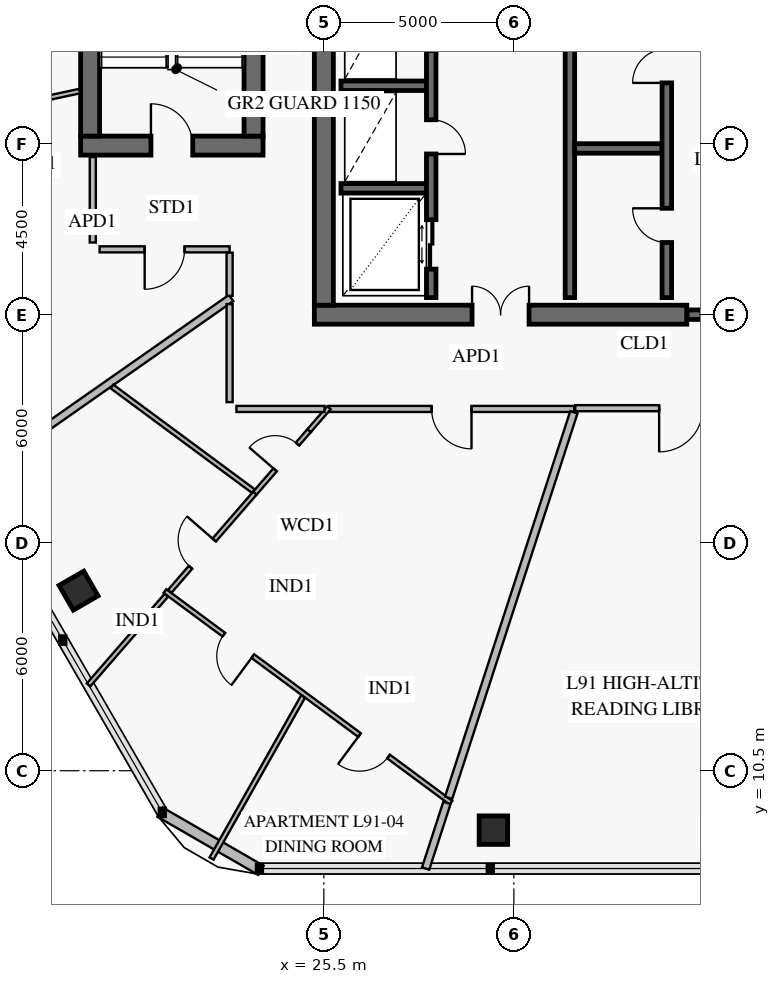
"""IFC4 building model, lengths in metres.
Left out: names, types, materials, properties, quantities, classifications, styles, units other than length and angle.
Written with IfcOpenShell. Run it as: python <this file> out.ifc"""

import sys

from ifc_helpers import new_model, si_unit, direction, frame, frame_2d, origin, origin_2d, place, context, subcontext, project, spatial, rectangle, extrude, element, fill, save


model = new_model("IFC4")
c1 = context("Model", 3, precision=1e-05, world=origin(), true_north=direction((0.0, 1.0)))
c2 = subcontext(c1, "Body", "Model", "MODEL_VIEW")
j1 = project(units=[si_unit("LENGTHUNIT", "METRE"), si_unit("PLANEANGLEUNIT", "RADIAN")], contexts=[c1])
p1 = place(None, origin())
s1 = spatial("IfcSite", under=j1, at=p1, CompositionType="ELEMENT")
p2 = place(p1, origin())
s2 = spatial("IfcBuilding", under=s1, at=p2, CompositionType="ELEMENT")
p3 = place(p2, frame((0.0, 0.0, 357.6)))
s3 = spatial("IfcBuildingStorey", under=s2, at=p3, CompositionType="ELEMENT", Elevation=357.6)
p4 = place(p3, frame((25.25, 22.5, 0.0), z_axis=(0.0, 0.0, 1.0), x_axis=(1.0, 0.0, 0.0)))
e1 = element("IfcWall", 1, at=p4, inside=s3, PredefinedType="SHEAR", context=c2, shape_type="SweptSolid", body=[
    extrude(rectangle(XDim=9.8, YDim=0.5, at=frame_2d((4.9, 0.0))), origin(), (0.0, 0.0, 1.0), 3.8),
])
p5 = place(p4, frame((4.15, 0.0, 0.0)))
e2 = element("IfcOpeningElement", 2, at=p5, cuts=e1, PredefinedType="OPENING", context=c2, shape_type="SweptSolid", body=[
    extrude(rectangle(XDim=1.5, YDim=2.15, at=frame_2d((0.75, 1.075))), frame((0.0, 0.262, 0.0), z_axis=(0.0, -1.0, 0.0), x_axis=(1.0, 0.0, 0.0)), (0.0, 0.0, 1.0), 0.524),
])
p6 = place(p3, frame((25.5, 22.75, 0.0), z_axis=(0.0, 0.0, 1.0), x_axis=(0.0, 1.0, 0.0)))
e3 = element("IfcWall", 3, at=p6, inside=s3, PredefinedType="SHEAR", context=c2, shape_type="SweptSolid", body=[
    extrude(rectangle(XDim=18.5, YDim=0.5, at=frame_2d((9.25, 0.0))), origin(), (0.0, 0.0, 1.0), 3.8),
])
p7 = place(p6, frame((9.0, 0.0, 0.0)))
e4 = element("IfcOpeningElement", 4, at=p7, cuts=e3, PredefinedType="OPENING", context=c2, shape_type="SweptSolid", body=[
    extrude(rectangle(XDim=1.1, YDim=2.15, at=frame_2d((0.55, 1.075))), frame((0.0, 0.262, 0.0), z_axis=(0.0, -1.0, 0.0), x_axis=(1.0, 0.0, 0.0)), (0.0, 0.0, 1.0), 0.524),
])
for number, where, z_axis, x_axis in (
    (5, (19.045, 15.238, 0.0), (0.0, 0.0, 1.0), (0.5, -0.866, 0.0)),
    (6, (29.961, 8.936, 0.0), (0.0, 0.0, 1.0), (1.0, 0.0, 0.0)),
):
    element("IfcColumn", number, at=place(p3, frame(where, z_axis=z_axis, x_axis=x_axis)), inside=s3, PredefinedType="COLUMN", context=c2, shape_type="SweptSolid", body=[
        extrude(rectangle(XDim=0.75, YDim=0.75, at=origin_2d()), origin(), (0.0, 0.0, 1.0), 3.35),
    ])
p8 = place(p3, frame((19.1, 26.95, 0.0), z_axis=(0.0, 0.0, 1.0), x_axis=(1.0, 0.0, 0.0)))
e7 = element("IfcWall", 7, at=p8, inside=s3, PredefinedType="SHEAR", context=c2, shape_type="SweptSolid", body=[
    extrude(rectangle(XDim=4.8, YDim=0.5, at=frame_2d((2.4, 0.0))), origin(), (0.0, 0.0, 1.0), 3.8),
])
p9 = place(p8, frame((1.85, 0.0, 0.0)))
e8 = element("IfcOpeningElement", 8, at=p9, cuts=e7, PredefinedType="OPENING", context=c2, shape_type="SweptSolid", body=[
    extrude(rectangle(XDim=1.1, YDim=2.15, at=frame_2d((0.55, 1.075))), frame((0.0, 0.262, 0.0), z_axis=(0.0, -1.0, 0.0), x_axis=(1.0, 0.0, 0.0)), (0.0, 0.0, 1.0), 0.524),
])
for number, where, z_axis, x_axis in (
    (9, (19.35, 27.2, 0.0), (0.0, 0.0, 1.0), (0.0, 1.0, 0.0)),
    (10, (23.65, 36.8, 0.0), (0.0, 0.0, 1.0), (0.0, -1.0, 0.0)),
):
    element("IfcWall", number, at=place(p3, frame(where, z_axis=z_axis, x_axis=x_axis)), inside=s3, PredefinedType="SHEAR", context=c2, shape_type="SweptSolid", body=[
        extrude(rectangle(XDim=9.6, YDim=0.5, at=frame_2d((4.8, 0.0))), origin(), (0.0, 0.0, 1.0), 3.8),
    ])
p10 = place(p3, frame((23.843, 7.878, 0.0), z_axis=(0.0, 0.0, 1.0), x_axis=(-0.866023752521, 0.50000286006, 0.0)))
e11 = element("IfcWall", 11, at=p10, inside=s3, PredefinedType="SOLIDWALL", context=c2, shape_type="SweptSolid", body=[
    extrude(rectangle(XDim=3.065, YDim=0.28, at=frame_2d((1.532, 0.0))), origin(), (0.0, 0.0, 1.0), 3.35),
])
p11 = place(p3, frame((35.06, 22.5, 0.0), z_axis=(0.0, 0.0, 1.0), x_axis=(1.0, 0.0, 0.0)))
e12 = element("IfcWall", 12, at=p11, inside=s3, PredefinedType="SOLIDWALL", context=c2, shape_type="SweptSolid", body=[
    extrude(rectangle(XDim=2.28, YDim=0.25, at=frame_2d((1.14, 0.0))), origin(), (0.0, 0.0, 1.0), 3.8),
])
p12 = place(p11, frame((0.39, 0.0, 0.0)))
e13 = element("IfcOpeningElement", 13, at=p12, cuts=e12, PredefinedType="OPENING", context=c2, shape_type="SweptSolid", body=[
    extrude(rectangle(XDim=1.5, YDim=2.15, at=frame_2d((0.75, 1.075))), frame((0.0, 0.137, 0.0), z_axis=(0.0, -1.0, 0.0), x_axis=(1.0, 0.0, 0.0)), (0.0, 0.0, 1.0), 0.274),
])
for number, where, z_axis, x_axis in (
    (14, (25.95, 25.825, 0.0), (0.0, 0.0, 1.0), (1.0, 0.0, 0.0)),
    (15, (25.95, 28.525, 0.0), (0.0, 0.0, 1.0), (1.0, 0.0, 0.0)),
):
    element("IfcWall", number, at=place(p3, frame(where, z_axis=z_axis, x_axis=x_axis)), inside=s3, PredefinedType="SOLIDWALL", context=c2, shape_type="SweptSolid", body=[
        extrude(rectangle(XDim=2.25, YDim=0.25, at=frame_2d((1.125, 0.0))), origin(), (0.0, 0.0, 1.0), 3.8),
    ])
p13 = place(p3, frame((28.325, 22.95, 0.0), z_axis=(0.0, 0.0, 1.0), x_axis=(0.0, 1.0, 0.0)))
e16 = element("IfcWall", 16, at=p13, inside=s3, PredefinedType="SOLIDWALL", context=c2, shape_type="SweptSolid", body=[
    extrude(rectangle(XDim=8.2, YDim=0.25, at=frame_2d((4.1, 0.0))), origin(), (0.0, 0.0, 1.0), 3.8),
])
p14 = place(p13, frame((0.75, 0.0, 0.0)))
e17 = element("IfcOpeningElement", 17, at=p14, cuts=e16, PredefinedType="OPENING", context=c2, shape_type="SweptSolid", body=[
    extrude(rectangle(XDim=1.3, YDim=2.3, at=frame_2d((0.65, 1.15))), frame((0.0, 0.137, 0.0), z_axis=(0.0, -1.0, 0.0), x_axis=(1.0, 0.0, 0.0)), (0.0, 0.0, 1.0), 0.274),
])
p15 = place(p13, frame((3.78, 0.0, 0.0)))
e18 = element("IfcOpeningElement", 18, at=p15, cuts=e16, PredefinedType="OPENING", context=c2, shape_type="SweptSolid", body=[
    extrude(rectangle(XDim=0.9, YDim=2.1, at=frame_2d((0.45, 1.05))), frame((0.0, 0.137, 0.0), z_axis=(0.0, -1.0, 0.0), x_axis=(1.0, 0.0, 0.0)), (0.0, 0.0, 1.0), 0.274),
])
p16 = place(p13, frame((6.5, 0.0, 0.0)))
e19 = element("IfcOpeningElement", 19, at=p16, cuts=e16, PredefinedType="OPENING", context=c2, shape_type="SweptSolid", body=[
    extrude(rectangle(XDim=0.9, YDim=2.1, at=frame_2d((0.45, 1.05))), frame((0.0, 0.137, 0.0), z_axis=(0.0, -1.0, 0.0), x_axis=(1.0, 0.0, 0.0)), (0.0, 0.0, 1.0), 0.274),
])
p17 = place(p3, frame((31.975, 22.95, 0.0), z_axis=(0.0, 0.0, 1.0), x_axis=(0.0, 1.0, 0.0)))
e20 = element("IfcWall", 20, at=p17, inside=s3, PredefinedType="SOLIDWALL", context=c2, shape_type="SweptSolid", body=[
    extrude(rectangle(XDim=8.2, YDim=0.25, at=frame_2d((4.1, 0.0))), origin(), (0.0, 0.0, 1.0), 3.8),
])
p18 = place(p3, frame((32.1, 26.875, 0.0), z_axis=(0.0, 0.0, 1.0), x_axis=(1.0, 0.0, 0.0)))
e21 = element("IfcWall", 21, at=p18, inside=s3, PredefinedType="SOLIDWALL", context=c2, shape_type="SweptSolid", body=[
    extrude(rectangle(XDim=2.3, YDim=0.25, at=frame_2d((1.15, 0.0))), origin(), (0.0, 0.0, 1.0), 3.8),
])
p19 = place(p3, frame((34.525, 22.95, 0.0), z_axis=(0.0, 0.0, 1.0), x_axis=(0.0, 1.0, 0.0)))
e22 = element("IfcWall", 22, at=p19, inside=s3, PredefinedType="SOLIDWALL", context=c2, shape_type="SweptSolid", body=[
    extrude(rectangle(XDim=8.2, YDim=0.25, at=frame_2d((4.1, 0.0))), origin(), (0.0, 0.0, 1.0), 3.8),
])
p20 = place(p19, frame((1.45, 0.0, 0.0)))
e23 = element("IfcOpeningElement", 23, at=p20, cuts=e22, PredefinedType="OPENING", context=c2, shape_type="SweptSolid", body=[
    extrude(rectangle(XDim=0.9, YDim=2.1, at=frame_2d((0.45, 1.05))), frame((0.0, 0.137, 0.0), z_axis=(0.0, -1.0, 0.0), x_axis=(1.0, 0.0, 0.0)), (0.0, 0.0, 1.0), 0.274),
])
p21 = place(p19, frame((5.65, 0.0, 0.0)))
e24 = element("IfcOpeningElement", 24, at=p21, cuts=e22, PredefinedType="OPENING", context=c2, shape_type="SweptSolid", body=[
    extrude(rectangle(XDim=0.9, YDim=2.1, at=frame_2d((0.45, 1.05))), frame((0.0, 0.137, 0.0), z_axis=(0.0, -1.0, 0.0), x_axis=(1.0, 0.0, 0.0)), (0.0, 0.0, 1.0), 0.274),
])
p22 = place(p3, frame((19.075, 28.384, 0.0), z_axis=(0.0, 0.0, 1.0), x_axis=(-0.977920196039, -0.208978683552, 0.0)))
e25 = element("IfcWall", 25, at=p22, inside=s3, PredefinedType="PARTITIONING", context=c2, shape_type="SweptSolid", body=[
    extrude(rectangle(XDim=3.514, YDim=0.12, at=frame_2d((1.757, 0.0))), origin(), (0.0, 0.0, 1.0), 3.35),
])
p23 = place(p22, frame((1.026, 0.0, 0.0)))
e26 = element("IfcOpeningElement", 26, at=p23, cuts=e25, PredefinedType="OPENING", context=c2, shape_type="SweptSolid", body=[
    extrude(rectangle(XDim=0.9, YDim=2.1, at=frame_2d((0.45, 1.05))), frame((0.0, 0.072, 0.0), z_axis=(0.0, -1.0, 0.0), x_axis=(1.0, 0.0, 0.0)), (0.0, 0.0, 1.0), 0.144),
])
p24 = place(p3, frame((19.6, 24.22, 0.0), z_axis=(0.0, 0.0, 1.0), x_axis=(1.0, 0.0, 0.0)))
e27 = element("IfcWall", 27, at=p24, inside=s3, PredefinedType="PARTITIONING", context=c2, shape_type="SweptSolid", body=[
    extrude(rectangle(XDim=3.42, YDim=0.16, at=frame_2d((1.71, 0.0))), origin(), (0.0, 0.0, 1.0), 3.35),
])
p25 = place(p24, frame((1.185, 0.0, 0.0)))
e28 = element("IfcOpeningElement", 28, at=p25, cuts=e27, PredefinedType="OPENING", context=c2, shape_type="SweptSolid", body=[
    extrude(rectangle(XDim=1.05, YDim=2.15, at=frame_2d((0.525, 1.075))), frame((0.0, 0.092, 0.0), z_axis=(0.0, -1.0, 0.0), x_axis=(1.0, 0.0, 0.0)), (0.0, 0.0, 1.0), 0.184),
])
p26 = place(p3, frame((21.318, 15.227, 0.0), z_axis=(0.0, 0.0, 1.0), x_axis=(0.803862842845, -0.594814702149, 0.0)))
e29 = element("IfcWall", 29, at=p26, inside=s3, PredefinedType="PARTITIONING", context=c2, shape_type="SweptSolid", body=[
    extrude(rectangle(XDim=9.364, YDim=0.12, at=frame_2d((4.682, 0.0))), origin(), (0.0, 0.0, 1.0), 2.77),
])
p27 = place(p26, frame((1.928, 0.0, 0.0)))
e30 = element("IfcOpeningElement", 30, at=p27, cuts=e29, PredefinedType="OPENING", context=c2, shape_type="SweptSolid", body=[
    extrude(rectangle(XDim=0.95, YDim=2.1, at=frame_2d((0.475, 1.05))), frame((0.0, 0.072, 0.0), z_axis=(0.0, -1.0, 0.0), x_axis=(1.0, 0.0, 0.0)), (0.0, 0.0, 1.0), 0.144),
])
p28 = place(p26, frame((6.369, 0.0, 0.0)))
e31 = element("IfcOpeningElement", 31, at=p28, cuts=e29, PredefinedType="OPENING", context=c2, shape_type="SweptSolid", body=[
    extrude(rectangle(XDim=0.95, YDim=2.1, at=frame_2d((0.475, 1.05))), frame((0.0, 0.072, 0.0), z_axis=(0.0, -1.0, 0.0), x_axis=(1.0, 0.0, 0.0)), (0.0, 0.0, 1.0), 0.144),
])
p29 = place(p3, frame((25.114, 19.45, 0.0), z_axis=(0.0, 0.0, 1.0), x_axis=(-0.65532612628, -0.755346058582, 0.0)))
e32 = element("IfcWall", 32, at=p29, inside=s3, PredefinedType="PARTITIONING", context=c2, shape_type="SweptSolid", body=[
    extrude(rectangle(XDim=2.185, YDim=0.12, at=frame_2d((1.092, 0.0))), origin(), (0.0, 0.0, 1.0), 3.35),
])
p30 = place(p29, frame((0.468, 0.0, 0.0)))
e33 = element("IfcOpeningElement", 33, at=p30, cuts=e32, PredefinedType="OPENING", context=c2, shape_type="SweptSolid", body=[
    extrude(rectangle(XDim=0.9, YDim=2.1, at=frame_2d((0.45, 1.05))), frame((0.0, 0.072, 0.0), z_axis=(0.0, -1.0, 0.0), x_axis=(1.0, 0.0, 0.0)), (0.0, 0.0, 1.0), 0.144),
])
p31 = place(p3, frame((23.682, 17.8, 0.0), z_axis=(0.0, 0.0, 1.0), x_axis=(-0.655229787073, -0.755429630166, 0.0)))
e34 = element("IfcWall", 34, at=p31, inside=s3, PredefinedType="PARTITIONING", context=c2, shape_type="SweptSolid", body=[
    extrude(rectangle(XDim=3.416, YDim=0.12, at=frame_2d((1.708, 0.0))), origin(), (0.0, 0.0, 1.0), 3.35),
])
p32 = place(p31, frame((1.627, 0.0, 0.0)))
e35 = element("IfcOpeningElement", 35, at=p32, cuts=e34, PredefinedType="OPENING", context=c2, shape_type="SweptSolid", body=[
    extrude(rectangle(XDim=0.95, YDim=2.1, at=frame_2d((0.475, 1.05))), frame((0.0, 0.072, 0.0), z_axis=(0.0, -1.0, 0.0), x_axis=(1.0, 0.0, 0.0)), (0.0, 0.0, 1.0), 0.144),
])
p33 = place(p3, frame((21.354, 15.116, 0.0), z_axis=(0.0, 0.0, 1.0), x_axis=(-0.655266746687, -0.755397571273, 0.0)))
e36 = element("IfcWall", 36, at=p33, inside=s3, PredefinedType="PARTITIONING", context=c2, shape_type="SweptSolid", body=[
    extrude(rectangle(XDim=3.123, YDim=0.12, at=frame_2d((1.562, 0.0))), origin(), (0.0, 0.0, 1.0), 2.77),
])
p34 = place(p3, frame((25.635, 20.02, 0.0), z_axis=(0.0, 0.0, 1.0), x_axis=(1.0, 0.0, 0.0)))
e37 = element("IfcWall", 37, at=p34, inside=s3, PredefinedType="PARTITIONING", context=c2, shape_type="SweptSolid", body=[
    extrude(rectangle(XDim=6.452, YDim=0.16, at=frame_2d((3.226, 0.0))), origin(), (0.0, 0.0, 1.0), 3.35),
])
p35 = place(p34, frame((2.701, 0.0, 0.0)))
e38 = element("IfcOpeningElement", 38, at=p35, cuts=e37, PredefinedType="OPENING", context=c2, shape_type="SweptSolid", body=[
    extrude(rectangle(XDim=1.05, YDim=2.15, at=frame_2d((0.525, 1.075))), frame((0.0, 0.092, 0.0), z_axis=(0.0, -1.0, 0.0), x_axis=(1.0, 0.0, 0.0)), (0.0, 0.0, 1.0), 0.184),
])
p36 = place(p3, frame((32.114, 20.04, 0.0), z_axis=(0.0, 0.0, 1.0), x_axis=(1.0, 0.0, 0.0)))
e39 = element("IfcWall", 39, at=p36, inside=s3, PredefinedType="PARTITIONING", context=c2, shape_type="SweptSolid", body=[
    extrude(rectangle(XDim=5.567, YDim=0.16, at=frame_2d((2.783, 0.0))), origin(), (0.0, 0.0, 1.0), 2.8),
])
p37 = place(p36, frame((2.208, 0.0, 0.0)))
e40 = element("IfcOpeningElement", 40, at=p37, cuts=e39, PredefinedType="OPENING", context=c2, shape_type="SweptSolid", body=[
    extrude(rectangle(XDim=1.15, YDim=2.2, at=frame_2d((0.575, 1.1))), frame((0.0, 0.092, 0.0), z_axis=(0.0, -1.0, 0.0), x_axis=(1.0, 0.0, 0.0)), (0.0, 0.0, 1.0), 0.184),
])
p38 = place(p3, frame((23.06, 22.939, 0.0), z_axis=(0.0, 0.0, 1.0), x_axis=(-0.819159279368, -0.573566103448, 0.0)))
e41 = element("IfcWall", 41, at=p38, inside=s3, PredefinedType="PARTITIONING", context=c2, shape_type="SweptSolid", body=[
    extrude(rectangle(XDim=8.369, YDim=0.2, at=frame_2d((4.185, 0.0))), origin(), (0.0, 0.0, 1.0), 2.77),
])
p39 = place(p3, frame((24.954, 12.452, 0.0), z_axis=(0.0, 0.0, 1.0), x_axis=(-0.491983334858, -0.870604616472, 0.0)))
e42 = element("IfcWall", 42, at=p39, inside=s3, PredefinedType="PARTITIONING", context=c2, shape_type="SweptSolid", body=[
    extrude(rectangle(XDim=4.897, YDim=0.12, at=frame_2d((2.449, 0.0))), origin(), (0.0, 0.0, 1.0), 2.77),
])
p40 = place(p3, frame((25.635, 20.051, 0.0), z_axis=(0.0, 0.0, 1.0), x_axis=(-0.655281179035, -0.755385051746, 0.0)))
e43 = element("IfcWall", 43, at=p40, inside=s3, PredefinedType="PARTITIONING", context=c2, shape_type="SweptSolid", body=[
    extrude(rectangle(XDim=0.795, YDim=0.12, at=frame_2d((0.397, 0.0))), origin(), (0.0, 0.0, 1.0), 3.35),
])
p41 = place(p3, frame((19.924, 20.612, 0.0), z_axis=(0.0, 0.0, 1.0), x_axis=(0.803864605419, -0.594812320111, 0.0)))
e44 = element("IfcWall", 44, at=p41, inside=s3, PredefinedType="PARTITIONING", context=c2, shape_type="SweptSolid", body=[
    extrude(rectangle(XDim=4.627, YDim=0.12, at=frame_2d((2.313, 0.0))), origin(), (0.0, 0.0, 1.0), 2.8),
])
p42 = place(p3, frame((32.079, 19.932, 0.0), z_axis=(0.0, 0.0, 1.0), x_axis=(-0.309001185402, -0.951061652796, 0.0)))
e45 = element("IfcWall", 45, at=p42, inside=s3, PredefinedType="PARTITIONING", context=c2, shape_type="SweptSolid", body=[
    extrude(rectangle(XDim=10.666, YDim=0.2, at=frame_2d((5.333, 0.0))), origin(), (0.0, 0.0, 1.0), 3.35),
])
p43 = place(p3, frame((28.739, 9.652, 0.0), z_axis=(0.0, 0.0, 1.0), x_axis=(-0.308955291245, -0.951076562644, 0.0)))
e46 = element("IfcWall", 46, at=p43, inside=s3, PredefinedType="PARTITIONING", context=c2, shape_type="SweptSolid", body=[
    extrude(rectangle(XDim=1.815, YDim=0.2, at=frame_2d((0.908, 0.0))), origin(), (0.0, 0.0, 1.0), 2.77),
])
p44 = place(p3, frame((19.42, 26.65, 0.0), z_axis=(0.0, 0.0, 1.0), x_axis=(0.0, -1.0, 0.0)))
e47 = element("IfcWall", 47, at=p44, inside=s3, PredefinedType="PARTITIONING", context=c2, shape_type="SweptSolid", body=[
    extrude(rectangle(XDim=2.25, YDim=0.16, at=frame_2d((1.125, 0.0))), origin(), (0.0, 0.0, 1.0), 3.35),
])
p45 = place(p3, frame((23.02, 24.132, 0.0), z_axis=(0.0, 0.0, 1.0), x_axis=(0.0, -1.0, 0.0)))
e48 = element("IfcWall", 48, at=p45, inside=s3, PredefinedType="PARTITIONING", context=c2, shape_type="SweptSolid", body=[
    extrude(rectangle(XDim=1.136, YDim=0.16, at=frame_2d((0.568, 0.0))), origin(), (0.0, 0.0, 1.0), 3.35),
])
p46 = place(p3, frame((23.02, 22.779, 0.0), z_axis=(0.0, 0.0, 1.0), x_axis=(0.0, -1.0, 0.0)))
e49 = element("IfcWall", 49, at=p46, inside=s3, PredefinedType="PARTITIONING", context=c2, shape_type="SweptSolid", body=[
    extrude(rectangle(XDim=2.579, YDim=0.16, at=frame_2d((1.29, 0.0))), origin(), (0.0, 0.0, 1.0), 3.35),
])
p47 = place(p3, frame((23.2, 20.02, 0.0), z_axis=(0.0, 0.0, 1.0), x_axis=(1.0, 0.0, 0.0)))
e50 = element("IfcWall", 50, at=p47, inside=s3, PredefinedType="PARTITIONING", context=c2, shape_type="SweptSolid", body=[
    extrude(rectangle(XDim=2.318, YDim=0.16, at=frame_2d((1.159, 0.0))), origin(), (0.0, 0.0, 1.0), 2.8),
])
p48 = place(p5, origin())
e51 = element("IfcDoor", 51, at=p48, inside=s3, OperationType="DOUBLE_DOOR_SINGLE_SWING", PredefinedType="DOOR", context=c2, shape_type="SweptSolid", body=[
    extrude(rectangle(XDim=1.5, YDim=2.15, at=frame_2d((0.75, 1.075))), frame((0.0, 0.025, 0.0), z_axis=(0.0, -1.0, 0.0), x_axis=(1.0, 0.0, 0.0)), (0.0, 0.0, 1.0), 0.05),
])
fill(e2, e51)
p49 = place(p9, origin())
e52 = element("IfcDoor", 52, at=p49, inside=s3, OperationType="SINGLE_SWING_LEFT", PredefinedType="USERDEFINED", context=c2, shape_type="SweptSolid", body=[
    extrude(rectangle(XDim=1.1, YDim=2.15, at=frame_2d((0.55, 1.075))), frame((0.0, 0.025, 0.0), z_axis=(0.0, -1.0, 0.0), x_axis=(1.0, 0.0, 0.0)), (0.0, 0.0, 1.0), 0.05),
])
fill(e8, e52)
p50 = place(p14, frame((1.3, 0.0, 0.0), z_axis=(0.0, 0.0, 1.0), x_axis=(-1.0, 0.0, 0.0)))
e53 = element("IfcDoor", 53, at=p50, inside=s3, OperationType="DOUBLE_DOOR_SLIDING", PredefinedType="DOOR", context=c2, shape_type="SweptSolid", body=[
    extrude(rectangle(XDim=1.3, YDim=2.3, at=frame_2d((0.65, 1.15))), frame((0.0, 0.025, 0.0), z_axis=(0.0, -1.0, 0.0), x_axis=(1.0, 0.0, 0.0)), (0.0, 0.0, 1.0), 0.05),
])
fill(e17, e53)
p51 = place(p15, frame((0.9, 0.0, 0.0), z_axis=(0.0, 0.0, 1.0), x_axis=(-1.0, 0.0, 0.0)))
e54 = element("IfcDoor", 54, at=p51, inside=s3, OperationType="SINGLE_SWING_RIGHT", PredefinedType="DOOR", context=c2, shape_type="SweptSolid", body=[
    extrude(rectangle(XDim=0.9, YDim=2.1, at=frame_2d((0.45, 1.05))), frame((0.0, 0.025, 0.0), z_axis=(0.0, -1.0, 0.0), x_axis=(1.0, 0.0, 0.0)), (0.0, 0.0, 1.0), 0.05),
])
fill(e18, e54)
p52 = place(p20, origin())
e55 = element("IfcDoor", 55, at=p52, inside=s3, OperationType="SINGLE_SWING_RIGHT", PredefinedType="DOOR", context=c2, shape_type="SweptSolid", body=[
    extrude(rectangle(XDim=0.9, YDim=2.1, at=frame_2d((0.45, 1.05))), frame((0.0, 0.025, 0.0), z_axis=(0.0, -1.0, 0.0), x_axis=(1.0, 0.0, 0.0)), (0.0, 0.0, 1.0), 0.05),
])
fill(e23, e55)
p53 = place(p21, origin())
e56 = element("IfcDoor", 56, at=p53, inside=s3, OperationType="SINGLE_SWING_LEFT", PredefinedType="DOOR", context=c2, shape_type="SweptSolid", body=[
    extrude(rectangle(XDim=0.9, YDim=2.1, at=frame_2d((0.45, 1.05))), frame((0.0, 0.025, 0.0), z_axis=(0.0, -1.0, 0.0), x_axis=(1.0, 0.0, 0.0)), (0.0, 0.0, 1.0), 0.05),
])
fill(e24, e56)
p54 = place(p25, frame((1.05, 0.0, 0.0), z_axis=(0.0, 0.0, 1.0), x_axis=(-1.0, 0.0, 0.0)))
e57 = element("IfcDoor", 57, at=p54, inside=s3, OperationType="SINGLE_SWING_RIGHT", PredefinedType="DOOR", context=c2, shape_type="SweptSolid", body=[
    extrude(rectangle(XDim=1.05, YDim=2.15, at=frame_2d((0.525, 1.075))), frame((0.0, 0.025, 0.0), z_axis=(0.0, -1.0, 0.0), x_axis=(1.0, 0.0, 0.0)), (0.0, 0.0, 1.0), 0.05),
])
fill(e28, e57)
p55 = place(p27, frame((0.95, 0.0, 0.0), z_axis=(0.0, 0.0, 1.0), x_axis=(-1.0, 0.0, 0.0)))
e58 = element("IfcDoor", 58, at=p55, inside=s3, OperationType="SINGLE_SWING_LEFT", PredefinedType="DOOR", context=c2, shape_type="SweptSolid", body=[
    extrude(rectangle(XDim=0.95, YDim=2.1, at=frame_2d((0.475, 1.05))), frame((0.0, 0.025, 0.0), z_axis=(0.0, -1.0, 0.0), x_axis=(1.0, 0.0, 0.0)), (0.0, 0.0, 1.0), 0.05),
])
fill(e30, e58)
p56 = place(p28, frame((0.95, 0.0, 0.0), z_axis=(0.0, 0.0, 1.0), x_axis=(-1.0, 0.0, 0.0)))
e59 = element("IfcDoor", 59, at=p56, inside=s3, OperationType="SINGLE_SWING_RIGHT", PredefinedType="DOOR", context=c2, shape_type="SweptSolid", body=[
    extrude(rectangle(XDim=0.95, YDim=2.1, at=frame_2d((0.475, 1.05))), frame((0.0, 0.025, 0.0), z_axis=(0.0, -1.0, 0.0), x_axis=(1.0, 0.0, 0.0)), (0.0, 0.0, 1.0), 0.05),
])
fill(e31, e59)
p57 = place(p30, frame((0.9, 0.0, 0.0), z_axis=(0.0, 0.0, 1.0), x_axis=(-1.0, 0.0, 0.0)))
e60 = element("IfcDoor", 60, at=p57, inside=s3, OperationType="SINGLE_SWING_LEFT", PredefinedType="DOOR", context=c2, shape_type="SweptSolid", body=[
    extrude(rectangle(XDim=0.9, YDim=2.1, at=frame_2d((0.45, 1.05))), frame((0.0, 0.025, 0.0), z_axis=(0.0, -1.0, 0.0), x_axis=(1.0, 0.0, 0.0)), (0.0, 0.0, 1.0), 0.05),
])
fill(e33, e60)
p58 = place(p32, frame((0.95, 0.0, 0.0), z_axis=(0.0, 0.0, 1.0), x_axis=(-1.0, 0.0, 0.0)))
e61 = element("IfcDoor", 61, at=p58, inside=s3, OperationType="SINGLE_SWING_RIGHT", PredefinedType="DOOR", context=c2, shape_type="SweptSolid", body=[
    extrude(rectangle(XDim=0.95, YDim=2.1, at=frame_2d((0.475, 1.05))), frame((0.0, 0.025, 0.0), z_axis=(0.0, -1.0, 0.0), x_axis=(1.0, 0.0, 0.0)), (0.0, 0.0, 1.0), 0.05),
])
fill(e35, e61)
p59 = place(p35, frame((1.05, 0.0, 0.0), z_axis=(0.0, 0.0, 1.0), x_axis=(-1.0, 0.0, 0.0)))
e62 = element("IfcDoor", 62, at=p59, inside=s3, OperationType="SINGLE_SWING_LEFT", PredefinedType="DOOR", context=c2, shape_type="SweptSolid", body=[
    extrude(rectangle(XDim=1.05, YDim=2.15, at=frame_2d((0.525, 1.075))), frame((0.0, 0.025, 0.0), z_axis=(0.0, -1.0, 0.0), x_axis=(1.0, 0.0, 0.0)), (0.0, 0.0, 1.0), 0.05),
])
fill(e38, e62)
p60 = place(p37, frame((1.15, 0.0, 0.0), z_axis=(0.0, 0.0, 1.0), x_axis=(-1.0, 0.0, 0.0)))
e63 = element("IfcDoor", 63, at=p60, inside=s3, OperationType="SINGLE_SWING_RIGHT", PredefinedType="DOOR", context=c2, shape_type="SweptSolid", body=[
    extrude(rectangle(XDim=1.15, YDim=2.2, at=frame_2d((0.575, 1.1))), frame((0.0, 0.025, 0.0), z_axis=(0.0, -1.0, 0.0), x_axis=(1.0, 0.0, 0.0)), (0.0, 0.0, 1.0), 0.05),
])
fill(e40, e63)
save(model, sys.argv[1])
